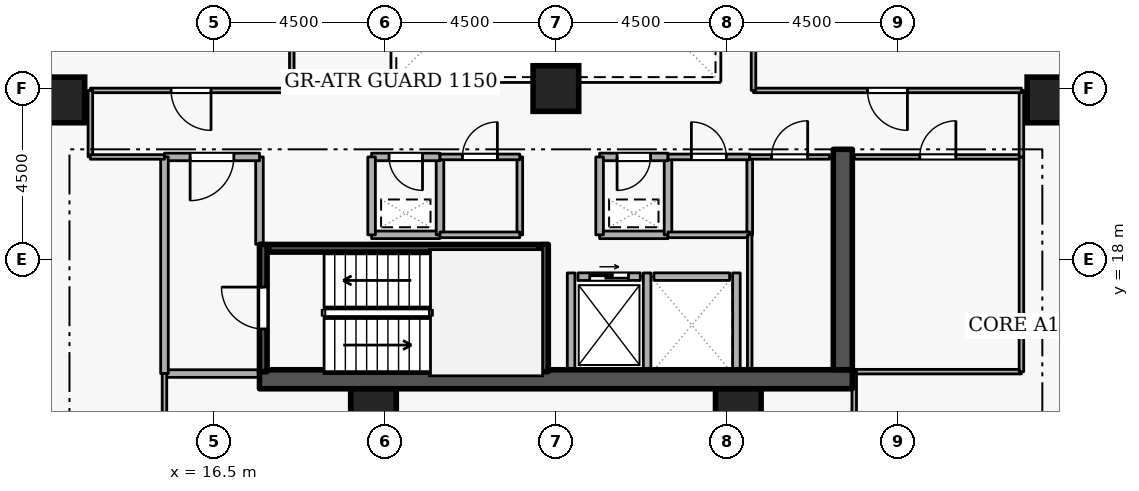
"""IFC4 building model, lengths in metres.
Left out: names, types, materials, properties, quantities, classifications, styles, units other than length and angle.
Written with IfcOpenShell. Run it as: python <this file> out.ifc"""

import sys

from ifc_helpers import new_model, si_unit, direction, frame, frame_2d, origin, origin_2d, place, context, subcontext, project, spatial, rectangle, extrude, element, fill, save


model = new_model("IFC4")
c1 = context("Model", 3, precision=1e-05, world=origin(), true_north=direction((0.0, 1.0)))
c2 = subcontext(c1, "Body", "Model", "MODEL_VIEW")
j1 = project(units=[si_unit("LENGTHUNIT", "METRE"), si_unit("PLANEANGLEUNIT", "RADIAN")], contexts=[c1])
p1 = place(None, origin())
s1 = spatial("IfcSite", under=j1, at=p1, CompositionType="ELEMENT")
p2 = place(p1, origin())
s2 = spatial("IfcBuilding", under=s1, at=p2, CompositionType="ELEMENT")
p3 = place(p2, frame((0.0, 0.0, 126.9)))
s3 = spatial("IfcBuildingStorey", under=s2, at=p3, CompositionType="ELEMENT", Elevation=126.9)
p4 = place(p3, frame((17.7, 14.85, 0.0), z_axis=(0.0, 0.0, 1.0), x_axis=(1.0, 0.0, 0.0)))
e1 = element("IfcWall", 1, at=p4, inside=s3, PredefinedType="SHEAR", context=c2, shape_type="SweptSolid", body=[
    extrude(rectangle(XDim=15.6, YDim=0.5, at=frame_2d((7.8, 0.0))), origin(), (0.0, 0.0, 1.0), 3.6),
])
p5 = place(p3, frame((33.05, 15.1, 0.0), z_axis=(0.0, 0.0, 1.0), x_axis=(0.0, 1.0, 0.0)))
e2 = element("IfcWall", 2, at=p5, inside=s3, PredefinedType="SHEAR", context=c2, shape_type="SweptSolid", body=[
    extrude(rectangle(XDim=5.8, YDim=0.5, at=frame_2d((2.9, 0.0))), origin(), (0.0, 0.0, 1.0), 3.6),
])
for number, where, z_axis, x_axis in (
    (3, (12.5, 22.2, 0.0), (0.0, 0.0, 1.0), (1.0, 0.0, 0.0)),
    (4, (38.5, 22.2, 0.0), (0.0, 0.0, 1.0), (1.0, 0.0, 0.0)),
    (5, (20.7, 14.0, 0.0), (0.0, 0.0, 1.0), (1.0, 0.0, 0.0)),
    (6, (30.3, 14.0, 0.0), (0.0, 0.0, 1.0), (1.0, 0.0, 0.0)),
    (7, (25.5, 22.5, 0.0), (0.0, 0.0, 1.0), (1.0, 0.0, 0.0)),
):
    element("IfcColumn", number, at=place(p3, frame(where, z_axis=z_axis, x_axis=x_axis)), inside=s3, PredefinedType="COLUMN", context=c2, shape_type="SweptSolid", body=[
        extrude(rectangle(XDim=1.2, YDim=1.2, at=origin_2d()), origin(), (0.0, 0.0, 1.0), 3.6),
    ])
p6 = place(p3, frame((26.08, 17.55, 0.0), z_axis=(0.0, 0.0, 1.0), x_axis=(1.0, 0.0, 0.0)))
e8 = element("IfcWall", 8, at=p6, inside=s3, PredefinedType="STANDARD", context=c2, shape_type="SweptSolid", body=[
    extrude(rectangle(XDim=1.64, YDim=0.2, at=frame_2d((0.82, 0.0))), origin(), (0.0, 0.0, 1.0), 3.34),
])
p7 = place(p6, frame((0.31, 0.0, 0.0)))
e9 = element("IfcOpeningElement", 9, at=p7, cuts=e8, PredefinedType="OPENING", context=c2, shape_type="SweptSolid", body=[
    extrude(rectangle(XDim=1.02, YDim=2.06, at=frame_2d((0.51, 1.03))), frame((0.0, 0.11, 0.0), z_axis=(0.0, -1.0, 0.0), x_axis=(1.0, 0.0, 0.0)), (0.0, 0.0, 1.0), 0.22),
])
p8 = place(p3, frame((28.08, 17.55, 0.0), z_axis=(0.0, 0.0, 1.0), x_axis=(1.0, 0.0, 0.0)))
e10 = element("IfcWall", 10, at=p8, inside=s3, PredefinedType="STANDARD", context=c2, shape_type="SweptSolid", body=[
    extrude(rectangle(XDim=1.99, YDim=0.2, at=frame_2d((0.995, 0.0))), origin(), (0.0, 0.0, 1.0), 3.34),
])
for number, where, z_axis, x_axis in (
    (11, (27.9, 15.112, 0.0), (0.0, 0.0, 1.0), (0.0, 1.0, 0.0)),
    (12, (25.9, 15.112, 0.0), (0.0, 0.0, 1.0), (0.0, 1.0, 0.0)),
    (13, (30.25, 15.112, 0.0), (0.0, 0.0, 1.0), (0.0, 1.0, 0.0)),
):
    element("IfcWall", number, at=place(p3, frame(where, z_axis=z_axis, x_axis=x_axis)), inside=s3, PredefinedType="STANDARD", context=c2, shape_type="SweptSolid", body=[
        extrude(rectangle(XDim=2.536, YDim=0.2, at=frame_2d((1.268, 0.0))), origin(), (0.0, 0.0, 1.0), 3.34),
    ])
p9 = place(p3, frame((17.8, 15.05, 0.0), z_axis=(0.0, 0.0, 1.0), x_axis=(0.0, 1.0, 0.0)))
e14 = element("IfcWall", 14, at=p9, inside=s3, PredefinedType="SHEAR", context=c2, shape_type="SweptSolid", body=[
    extrude(rectangle(XDim=3.35, YDim=0.2, at=frame_2d((1.675, 0.0))), origin(), (0.0, 0.0, 1.0), 3.6),
])
p10 = place(p9, frame((1.125, 0.0, 0.0)))
e15 = element("IfcOpeningElement", 15, at=p10, cuts=e14, PredefinedType="OPENING", context=c2, shape_type="SweptSolid", body=[
    extrude(rectangle(XDim=1.1, YDim=2.1, at=frame_2d((0.55, 1.05))), frame((0.0, 0.11, 0.0), z_axis=(0.0, -1.0, 0.0), x_axis=(1.0, 0.0, 0.0)), (0.0, 0.0, 1.0), 0.22),
])
p11 = place(p3, frame((25.2, 18.4, 0.0), z_axis=(0.0, 0.0, 1.0), x_axis=(0.0, -1.0, 0.0)))
e16 = element("IfcWall", 16, at=p11, inside=s3, PredefinedType="SHEAR", context=c2, shape_type="SweptSolid", body=[
    extrude(rectangle(XDim=3.35, YDim=0.2, at=frame_2d((1.675, 0.0))), origin(), (0.0, 0.0, 1.0), 3.6),
])
p12 = place(p3, frame((25.05, 18.297, 0.0), z_axis=(0.0, 0.0, 1.0), x_axis=(-1.0, 0.0, 0.0)))
e17 = element("IfcWall", 17, at=p12, inside=s3, PredefinedType="SHEAR", context=c2, shape_type="SweptSolid", body=[
    extrude(rectangle(XDim=7.1, YDim=0.2, at=frame_2d((3.55, 0.0))), origin(), (0.0, 0.0, 1.0), 3.6),
])
p13 = place(p3, frame((15.2, 15.0, 0.0), z_axis=(0.0, 0.0, 1.0), x_axis=(1.0, 0.0, 0.0)))
e18 = element("IfcWall", 18, at=p13, inside=s3, PredefinedType="STANDARD", context=c2, shape_type="SweptSolid", body=[
    extrude(rectangle(XDim=2.5, YDim=0.2, at=frame_2d((1.25, 0.0))), origin(), (0.0, 0.0, 1.0), 3.34),
])
p14 = place(p3, frame((17.7, 18.4, 0.0), z_axis=(0.0, 0.0, 1.0), x_axis=(0.0, 1.0, 0.0)))
e19 = element("IfcWall", 19, at=p14, inside=s3, PredefinedType="STANDARD", context=c2, shape_type="SweptSolid", body=[
    extrude(rectangle(XDim=2.3, YDim=0.2, at=frame_2d((1.15, 0.0))), origin(), (0.0, 0.0, 1.0), 2.545),
])
p15 = place(p3, frame((17.7, 20.7, 0.0), z_axis=(0.0, 0.0, 1.0), x_axis=(-1.0, 0.0, 0.0)))
e20 = element("IfcWall", 20, at=p15, inside=s3, PredefinedType="STANDARD", context=c2, shape_type="SweptSolid", body=[
    extrude(rectangle(XDim=2.5, YDim=0.2, at=frame_2d((1.25, 0.0))), origin(), (0.0, 0.0, 1.0), 3.34),
])
p16 = place(p15, frame((0.675, 0.0, 0.0)))
e21 = element("IfcOpeningElement", 21, at=p16, cuts=e20, PredefinedType="OPENING", context=c2, shape_type="SweptSolid", body=[
    extrude(rectangle(XDim=1.15, YDim=2.1, at=frame_2d((0.575, 1.05))), frame((0.0, 0.11, 0.0), z_axis=(0.0, -1.0, 0.0), x_axis=(1.0, 0.0, 0.0)), (0.0, 0.0, 1.0), 0.22),
])
p17 = place(p3, frame((15.2, 20.7, 0.0), z_axis=(0.0, 0.0, 1.0), x_axis=(0.0, -1.0, 0.0)))
e22 = element("IfcWall", 22, at=p17, inside=s3, PredefinedType="STANDARD", context=c2, shape_type="SweptSolid", body=[
    extrude(rectangle(XDim=5.7, YDim=0.2, at=frame_2d((2.85, 0.0))), origin(), (0.0, 0.0, 1.0), 3.34),
])
p18 = place(p3, frame((26.65, 18.65, 0.0), z_axis=(0.0, 0.0, 1.0), x_axis=(1.0, 0.0, 0.0)))
e23 = element("IfcWall", 23, at=p18, inside=s3, PredefinedType="STANDARD", context=c2, shape_type="SweptSolid", body=[
    extrude(rectangle(XDim=1.8, YDim=0.2, at=frame_2d((0.9, 0.0))), origin(), (0.0, 0.0, 1.0), 3.34),
])
p19 = place(p3, frame((28.45, 18.65, 0.0), z_axis=(0.0, 0.0, 1.0), x_axis=(0.0, 1.0, 0.0)))
e24 = element("IfcWall", 24, at=p19, inside=s3, PredefinedType="STANDARD", context=c2, shape_type="SweptSolid", body=[
    extrude(rectangle(XDim=2.05, YDim=0.2, at=frame_2d((1.025, 0.0))), origin(), (0.0, 0.0, 1.0), 3.34),
])
p20 = place(p3, frame((28.45, 20.7, 0.0), z_axis=(0.0, 0.0, 1.0), x_axis=(-1.0, 0.0, 0.0)))
e25 = element("IfcWall", 25, at=p20, inside=s3, PredefinedType="STANDARD", context=c2, shape_type="SweptSolid", body=[
    extrude(rectangle(XDim=1.8, YDim=0.2, at=frame_2d((0.9, 0.0))), origin(), (0.0, 0.0, 1.0), 3.34),
])
p21 = place(p20, frame((0.46, 0.0, 0.0)))
e26 = element("IfcOpeningElement", 26, at=p21, cuts=e25, PredefinedType="OPENING", context=c2, shape_type="SweptSolid", body=[
    extrude(rectangle(XDim=0.88, YDim=2.04, at=frame_2d((0.44, 1.02))), frame((0.0, 0.11, 0.0), z_axis=(0.0, -1.0, 0.0), x_axis=(1.0, 0.0, 0.0)), (0.0, 0.0, 1.0), 0.22),
])
p22 = place(p3, frame((26.65, 20.7, 0.0), z_axis=(0.0, 0.0, 1.0), x_axis=(0.0, -1.0, 0.0)))
e27 = element("IfcWall", 27, at=p22, inside=s3, PredefinedType="STANDARD", context=c2, shape_type="SweptSolid", body=[
    extrude(rectangle(XDim=2.05, YDim=0.2, at=frame_2d((1.025, 0.0))), origin(), (0.0, 0.0, 1.0), 3.34),
])
p23 = place(p3, frame((20.65, 18.65, 0.0), z_axis=(0.0, 0.0, 1.0), x_axis=(1.0, 0.0, 0.0)))
e28 = element("IfcWall", 28, at=p23, inside=s3, PredefinedType="STANDARD", context=c2, shape_type="SweptSolid", body=[
    extrude(rectangle(XDim=1.8, YDim=0.2, at=frame_2d((0.9, 0.0))), origin(), (0.0, 0.0, 1.0), 3.34),
])
p24 = place(p3, frame((22.45, 18.65, 0.0), z_axis=(0.0, 0.0, 1.0), x_axis=(0.0, 1.0, 0.0)))
e29 = element("IfcWall", 29, at=p24, inside=s3, PredefinedType="STANDARD", context=c2, shape_type="SweptSolid", body=[
    extrude(rectangle(XDim=2.05, YDim=0.2, at=frame_2d((1.025, 0.0))), origin(), (0.0, 0.0, 1.0), 3.34),
])
p25 = place(p3, frame((22.45, 20.7, 0.0), z_axis=(0.0, 0.0, 1.0), x_axis=(-1.0, 0.0, 0.0)))
e30 = element("IfcWall", 30, at=p25, inside=s3, PredefinedType="STANDARD", context=c2, shape_type="SweptSolid", body=[
    extrude(rectangle(XDim=1.8, YDim=0.2, at=frame_2d((0.9, 0.0))), origin(), (0.0, 0.0, 1.0), 3.34),
])
p26 = place(p25, frame((0.46, 0.0, 0.0)))
e31 = element("IfcOpeningElement", 31, at=p26, cuts=e30, PredefinedType="OPENING", context=c2, shape_type="SweptSolid", body=[
    extrude(rectangle(XDim=0.88, YDim=2.04, at=frame_2d((0.44, 1.02))), frame((0.0, 0.11, 0.0), z_axis=(0.0, -1.0, 0.0), x_axis=(1.0, 0.0, 0.0)), (0.0, 0.0, 1.0), 0.22),
])
p27 = place(p3, frame((20.65, 20.7, 0.0), z_axis=(0.0, 0.0, 1.0), x_axis=(0.0, -1.0, 0.0)))
e32 = element("IfcWall", 32, at=p27, inside=s3, PredefinedType="STANDARD", context=c2, shape_type="SweptSolid", body=[
    extrude(rectangle(XDim=2.05, YDim=0.2, at=frame_2d((1.025, 0.0))), origin(), (0.0, 0.0, 1.0), 3.34),
])
p28 = place(p3, frame((24.55, 20.7, 0.0), z_axis=(0.0, 0.0, 1.0), x_axis=(0.0, -1.0, 0.0)))
e33 = element("IfcWall", 33, at=p28, inside=s3, PredefinedType="PARTITIONING", context=c2, shape_type="SweptSolid", body=[
    extrude(rectangle(XDim=2.05, YDim=0.15, at=frame_2d((1.025, 0.0))), origin(), (0.0, 0.0, 1.0), 3.34),
])
p29 = place(p3, frame((24.55, 18.65, 0.0), z_axis=(0.0, 0.0, 1.0), x_axis=(-1.0, 0.0, 0.0)))
e34 = element("IfcWall", 34, at=p29, inside=s3, PredefinedType="PARTITIONING", context=c2, shape_type="SweptSolid", body=[
    extrude(rectangle(XDim=2.1, YDim=0.15, at=frame_2d((1.05, 0.0))), origin(), (0.0, 0.0, 1.0), 3.34),
])
p30 = place(p3, frame((22.45, 20.7, 0.0), z_axis=(0.0, 0.0, 1.0), x_axis=(1.0, 0.0, 0.0)))
e35 = element("IfcWall", 35, at=p30, inside=s3, PredefinedType="PARTITIONING", context=c2, shape_type="SweptSolid", body=[
    extrude(rectangle(XDim=2.1, YDim=0.15, at=frame_2d((1.05, 0.0))), origin(), (0.0, 0.0, 1.0), 3.34),
])
p31 = place(p30, frame((0.59, 0.0, 0.0)))
e36 = element("IfcOpeningElement", 36, at=p31, cuts=e35, PredefinedType="OPENING", context=c2, shape_type="SweptSolid", body=[
    extrude(rectangle(XDim=0.92, YDim=2.08, at=frame_2d((0.46, 1.04))), frame((0.0, 0.085, 0.0), z_axis=(0.0, -1.0, 0.0), x_axis=(1.0, 0.0, 0.0)), (0.0, 0.0, 1.0), 0.17),
])
p32 = place(p3, frame((30.6, 20.7, 0.0), z_axis=(0.0, 0.0, 1.0), x_axis=(0.0, -1.0, 0.0)))
e37 = element("IfcWall", 37, at=p32, inside=s3, PredefinedType="PARTITIONING", context=c2, shape_type="SweptSolid", body=[
    extrude(rectangle(XDim=2.05, YDim=0.15, at=frame_2d((1.025, 0.0))), origin(), (0.0, 0.0, 1.0), 3.34),
])
p33 = place(p3, frame((30.6, 18.65, 0.0), z_axis=(0.0, 0.0, 1.0), x_axis=(-1.0, 0.0, 0.0)))
e38 = element("IfcWall", 38, at=p33, inside=s3, PredefinedType="PARTITIONING", context=c2, shape_type="SweptSolid", body=[
    extrude(rectangle(XDim=2.15, YDim=0.15, at=frame_2d((1.075, 0.0))), origin(), (0.0, 0.0, 1.0), 3.34),
])
p34 = place(p3, frame((28.45, 20.7, 0.0), z_axis=(0.0, 0.0, 1.0), x_axis=(1.0, 0.0, 0.0)))
e39 = element("IfcWall", 39, at=p34, inside=s3, PredefinedType="PARTITIONING", context=c2, shape_type="SweptSolid", body=[
    extrude(rectangle(XDim=2.15, YDim=0.15, at=frame_2d((1.075, 0.0))), origin(), (0.0, 0.0, 1.0), 3.34),
])
p35 = place(p34, frame((0.615, 0.0, 0.0)))
e40 = element("IfcOpeningElement", 40, at=p35, cuts=e39, PredefinedType="OPENING", context=c2, shape_type="SweptSolid", body=[
    extrude(rectangle(XDim=0.92, YDim=2.08, at=frame_2d((0.46, 1.04))), frame((0.0, 0.085, 0.0), z_axis=(0.0, -1.0, 0.0), x_axis=(1.0, 0.0, 0.0)), (0.0, 0.0, 1.0), 0.17),
])
p36 = place(p3, frame((30.6, 15.1, 0.0), z_axis=(0.0, 0.0, 1.0), x_axis=(0.0, 1.0, 0.0)))
e41 = element("IfcWall", 41, at=p36, inside=s3, PredefinedType="PARTITIONING", context=c2, shape_type="SweptSolid", body=[
    extrude(rectangle(XDim=3.55, YDim=0.12, at=frame_2d((1.775, 0.0))), origin(), (0.0, 0.0, 1.0), 3.34),
])
p37 = place(p3, frame((30.6, 20.7, 0.0), z_axis=(0.0, 0.0, 1.0), x_axis=(1.0, 0.0, 0.0)))
e42 = element("IfcWall", 42, at=p37, inside=s3, PredefinedType="PARTITIONING", context=c2, shape_type="SweptSolid", body=[
    extrude(rectangle(XDim=2.1, YDim=0.12, at=frame_2d((1.05, 0.0))), origin(), (0.0, 0.0, 1.0), 3.34),
])
p38 = place(p37, frame((0.575, 0.0, 0.0)))
e43 = element("IfcOpeningElement", 43, at=p38, cuts=e42, PredefinedType="OPENING", context=c2, shape_type="SweptSolid", body=[
    extrude(rectangle(XDim=0.95, YDim=2.1, at=frame_2d((0.475, 1.05))), frame((0.0, 0.07, 0.0), z_axis=(0.0, -1.0, 0.0), x_axis=(1.0, 0.0, 0.0)), (0.0, 0.0, 1.0), 0.14),
])
p39 = place(p3, frame((37.75, 15.05, 0.0), z_axis=(0.0, 0.0, 1.0), x_axis=(-1.0, 0.0, 0.0)))
e44 = element("IfcWall", 44, at=p39, inside=s3, PredefinedType="PARTITIONING", context=c2, shape_type="SweptSolid", body=[
    extrude(rectangle(XDim=4.4, YDim=0.12, at=frame_2d((2.2, 0.0))), origin(), (0.0, 0.0, 1.0), 3.34),
])
p40 = place(p3, frame((33.35, 20.7, 0.0), z_axis=(0.0, 0.0, 1.0), x_axis=(1.0, 0.0, 0.0)))
e45 = element("IfcWall", 45, at=p40, inside=s3, PredefinedType="PARTITIONING", context=c2, shape_type="SweptSolid", body=[
    extrude(rectangle(XDim=4.4, YDim=0.12, at=frame_2d((2.2, 0.0))), origin(), (0.0, 0.0, 1.0), 3.34),
])
p41 = place(p40, frame((1.725, 0.0, 0.0)))
e46 = element("IfcOpeningElement", 46, at=p41, cuts=e45, PredefinedType="OPENING", context=c2, shape_type="SweptSolid", body=[
    extrude(rectangle(XDim=0.95, YDim=2.1, at=frame_2d((0.475, 1.05))), frame((0.0, 0.07, 0.0), z_axis=(0.0, -1.0, 0.0), x_axis=(1.0, 0.0, 0.0)), (0.0, 0.0, 1.0), 0.14),
])
p42 = place(p3, frame((37.75, 20.7, 0.0), z_axis=(0.0, 0.0, 1.0), x_axis=(0.0, -1.0, 0.0)))
e47 = element("IfcWall", 47, at=p42, inside=s3, PredefinedType="PARTITIONING", context=c2, shape_type="SweptSolid", body=[
    extrude(rectangle(XDim=5.65, YDim=0.12, at=frame_2d((2.825, 0.0))), origin(), (0.0, 0.0, 1.0), 3.34),
])
p43 = place(p3, frame((18.55, 22.45, 0.0), z_axis=(0.0, 0.0, 1.0), x_axis=(-1.0, 0.0, 0.0)))
e48 = element("IfcWall", 48, at=p43, inside=s3, PredefinedType="PARTITIONING", context=c2, shape_type="SweptSolid", body=[
    extrude(rectangle(XDim=5.3, YDim=0.12, at=frame_2d((2.65, 0.0))), origin(), (0.0, 0.0, 1.0), 3.34),
])
p44 = place(p43, frame((2.125, 0.0, 0.0)))
e49 = element("IfcOpeningElement", 49, at=p44, cuts=e48, PredefinedType="OPENING", context=c2, shape_type="SweptSolid", body=[
    extrude(rectangle(XDim=1.05, YDim=2.1, at=frame_2d((0.525, 1.05))), frame((0.0, 0.07, 0.0), z_axis=(0.0, -1.0, 0.0), x_axis=(1.0, 0.0, 0.0)), (0.0, 0.0, 1.0), 0.14),
])
p45 = place(p3, frame((13.25, 22.45, 0.0), z_axis=(0.0, 0.0, 1.0), x_axis=(0.0, -1.0, 0.0)))
e50 = element("IfcWall", 50, at=p45, inside=s3, PredefinedType="PARTITIONING", context=c2, shape_type="SweptSolid", body=[
    extrude(rectangle(XDim=1.75, YDim=0.12, at=frame_2d((0.875, 0.0))), origin(), (0.0, 0.0, 1.0), 3.34),
])
p46 = place(p3, frame((13.25, 20.7, 0.0), z_axis=(0.0, 0.0, 1.0), x_axis=(1.0, 0.0, 0.0)))
e51 = element("IfcWall", 51, at=p46, inside=s3, PredefinedType="PARTITIONING", context=c2, shape_type="SweptSolid", body=[
    extrude(rectangle(XDim=1.95, YDim=0.12, at=frame_2d((0.975, 0.0))), origin(), (0.0, 0.0, 1.0), 3.34),
])
p47 = place(p3, frame((15.2, 15.0, 0.0), z_axis=(0.0, 0.0, 1.0), x_axis=(0.0, -1.0, 0.0)))
e52 = element("IfcWall", 52, at=p47, inside=s3, PredefinedType="PARTITIONING", context=c2, shape_type="SweptSolid", body=[
    extrude(rectangle(XDim=11.72, YDim=0.12, at=frame_2d((5.86, 0.0))), origin(), (0.0, 0.0, 1.0), 3.34),
])
p48 = place(p3, frame((18.55, 27.0, 0.0), z_axis=(0.0, 0.0, 1.0), x_axis=(0.0, -1.0, 0.0)))
e53 = element("IfcWall", 53, at=p48, inside=s3, PredefinedType="PARTITIONING", context=c2, shape_type="SweptSolid", body=[
    extrude(rectangle(XDim=4.55, YDim=0.12, at=frame_2d((2.275, 0.0))), origin(), (0.0, 0.0, 1.0), 3.34),
])
p49 = place(p3, frame((33.35, 3.28, 0.0), z_axis=(0.0, 0.0, 1.0), x_axis=(0.0, 1.0, 0.0)))
e54 = element("IfcWall", 54, at=p49, inside=s3, PredefinedType="PARTITIONING", context=c2, shape_type="SweptSolid", body=[
    extrude(rectangle(XDim=11.77, YDim=0.12, at=frame_2d((5.885, 0.0))), origin(), (0.0, 0.0, 1.0), 2.545),
])
p50 = place(p3, frame((37.75, 20.7, 0.0), z_axis=(0.0, 0.0, 1.0), x_axis=(0.0, 1.0, 0.0)))
e55 = element("IfcWall", 55, at=p50, inside=s3, PredefinedType="PARTITIONING", context=c2, shape_type="SweptSolid", body=[
    extrude(rectangle(XDim=1.75, YDim=0.12, at=frame_2d((0.875, 0.0))), origin(), (0.0, 0.0, 1.0), 3.34),
])
p51 = place(p3, frame((37.75, 22.45, 0.0), z_axis=(0.0, 0.0, 1.0), x_axis=(-1.0, 0.0, 0.0)))
e56 = element("IfcWall", 56, at=p51, inside=s3, PredefinedType="PARTITIONING", context=c2, shape_type="SweptSolid", body=[
    extrude(rectangle(XDim=7.05, YDim=0.12, at=frame_2d((3.525, 0.0))), origin(), (0.0, 0.0, 1.0), 3.34),
])
p52 = place(p51, frame((3.0, 0.0, 0.0)))
e57 = element("IfcOpeningElement", 57, at=p52, cuts=e56, PredefinedType="OPENING", context=c2, shape_type="SweptSolid", body=[
    extrude(rectangle(XDim=1.05, YDim=2.1, at=frame_2d((0.525, 1.05))), frame((0.0, 0.07, 0.0), z_axis=(0.0, -1.0, 0.0), x_axis=(1.0, 0.0, 0.0)), (0.0, 0.0, 1.0), 0.14),
])
p53 = place(p3, frame((30.7, 22.45, 0.0), z_axis=(0.0, 0.0, 1.0), x_axis=(0.0, 1.0, 0.0)))
e58 = element("IfcWall", 58, at=p53, inside=s3, PredefinedType="PARTITIONING", context=c2, shape_type="SweptSolid", body=[
    extrude(rectangle(XDim=4.55, YDim=0.12, at=frame_2d((2.275, 0.0))), origin(), (0.0, 0.0, 1.0), 3.34),
])
p54 = place(p7, origin())
e59 = element("IfcDoor", 59, at=p54, inside=s3, OperationType="SLIDING_TO_LEFT", PredefinedType="DOOR", context=c2, shape_type="SweptSolid", body=[
    extrude(rectangle(XDim=1.02, YDim=2.06, at=frame_2d((0.51, 1.03))), frame((0.0, 0.025, 0.0), z_axis=(0.0, -1.0, 0.0), x_axis=(1.0, 0.0, 0.0)), (0.0, 0.0, 1.0), 0.05),
])
fill(e9, e59)
p55 = place(p10, origin())
e60 = element("IfcDoor", 60, at=p55, inside=s3, OperationType="SINGLE_SWING_RIGHT", PredefinedType="DOOR", context=c2, shape_type="SweptSolid", body=[
    extrude(rectangle(XDim=1.1, YDim=2.1, at=frame_2d((0.55, 1.05))), frame((0.0, 0.025, 0.0), z_axis=(0.0, -1.0, 0.0), x_axis=(1.0, 0.0, 0.0)), (0.0, 0.0, 1.0), 0.05),
])
fill(e15, e60)
p56 = place(p16, origin())
e61 = element("IfcDoor", 61, at=p56, inside=s3, OperationType="SINGLE_SWING_RIGHT", PredefinedType="DOOR", context=c2, shape_type="SweptSolid", body=[
    extrude(rectangle(XDim=1.15, YDim=2.1, at=frame_2d((0.575, 1.05))), frame((0.0, 0.025, 0.0), z_axis=(0.0, -1.0, 0.0), x_axis=(1.0, 0.0, 0.0)), (0.0, 0.0, 1.0), 0.05),
])
fill(e21, e61)
p57 = place(p21, origin())
e62 = element("IfcDoor", 62, at=p57, inside=s3, OperationType="SINGLE_SWING_RIGHT", PredefinedType="DOOR", context=c2, shape_type="SweptSolid", body=[
    extrude(rectangle(XDim=0.88, YDim=2.04, at=frame_2d((0.44, 1.02))), frame((0.0, 0.025, 0.0), z_axis=(0.0, -1.0, 0.0), x_axis=(1.0, 0.0, 0.0)), (0.0, 0.0, 1.0), 0.05),
])
fill(e26, e62)
p58 = place(p26, origin())
e63 = element("IfcDoor", 63, at=p58, inside=s3, OperationType="SINGLE_SWING_LEFT", PredefinedType="DOOR", context=c2, shape_type="SweptSolid", body=[
    extrude(rectangle(XDim=0.88, YDim=2.04, at=frame_2d((0.44, 1.02))), frame((0.0, 0.025, 0.0), z_axis=(0.0, -1.0, 0.0), x_axis=(1.0, 0.0, 0.0)), (0.0, 0.0, 1.0), 0.05),
])
fill(e31, e63)
p59 = place(p31, origin())
e64 = element("IfcDoor", 64, at=p59, inside=s3, OperationType="SINGLE_SWING_RIGHT", PredefinedType="DOOR", context=c2, shape_type="SweptSolid", body=[
    extrude(rectangle(XDim=0.92, YDim=2.08, at=frame_2d((0.46, 1.04))), frame((0.0, 0.025, 0.0), z_axis=(0.0, -1.0, 0.0), x_axis=(1.0, 0.0, 0.0)), (0.0, 0.0, 1.0), 0.05),
])
fill(e36, e64)
p60 = place(p35, origin())
e65 = element("IfcDoor", 65, at=p60, inside=s3, OperationType="SINGLE_SWING_LEFT", PredefinedType="DOOR", context=c2, shape_type="SweptSolid", body=[
    extrude(rectangle(XDim=0.92, YDim=2.08, at=frame_2d((0.46, 1.04))), frame((0.0, 0.025, 0.0), z_axis=(0.0, -1.0, 0.0), x_axis=(1.0, 0.0, 0.0)), (0.0, 0.0, 1.0), 0.05),
])
fill(e40, e65)
p61 = place(p38, origin())
e66 = element("IfcDoor", 66, at=p61, inside=s3, OperationType="SINGLE_SWING_RIGHT", PredefinedType="DOOR", context=c2, shape_type="SweptSolid", body=[
    extrude(rectangle(XDim=0.95, YDim=2.1, at=frame_2d((0.475, 1.05))), frame((0.0, 0.025, 0.0), z_axis=(0.0, -1.0, 0.0), x_axis=(1.0, 0.0, 0.0)), (0.0, 0.0, 1.0), 0.05),
])
fill(e43, e66)
p62 = place(p41, origin())
e67 = element("IfcDoor", 67, at=p62, inside=s3, OperationType="SINGLE_SWING_RIGHT", PredefinedType="DOOR", context=c2, shape_type="SweptSolid", body=[
    extrude(rectangle(XDim=0.95, YDim=2.1, at=frame_2d((0.475, 1.05))), frame((0.0, 0.025, 0.0), z_axis=(0.0, -1.0, 0.0), x_axis=(1.0, 0.0, 0.0)), (0.0, 0.0, 1.0), 0.05),
])
fill(e46, e67)
p63 = place(p44, origin())
e68 = element("IfcDoor", 68, at=p63, inside=s3, OperationType="SINGLE_SWING_LEFT", PredefinedType="DOOR", context=c2, shape_type="SweptSolid", body=[
    extrude(rectangle(XDim=1.05, YDim=2.1, at=frame_2d((0.525, 1.05))), frame((0.0, 0.025, 0.0), z_axis=(0.0, -1.0, 0.0), x_axis=(1.0, 0.0, 0.0)), (0.0, 0.0, 1.0), 0.05),
])
fill(e49, e68)
p64 = place(p52, origin())
e69 = element("IfcDoor", 69, at=p64, inside=s3, OperationType="SINGLE_SWING_LEFT", PredefinedType="DOOR", context=c2, shape_type="SweptSolid", body=[
    extrude(rectangle(XDim=1.05, YDim=2.1, at=frame_2d((0.525, 1.05))), frame((0.0, 0.025, 0.0), z_axis=(0.0, -1.0, 0.0), x_axis=(1.0, 0.0, 0.0)), (0.0, 0.0, 1.0), 0.05),
])
fill(e57, e69)
save(model, sys.argv[1])
